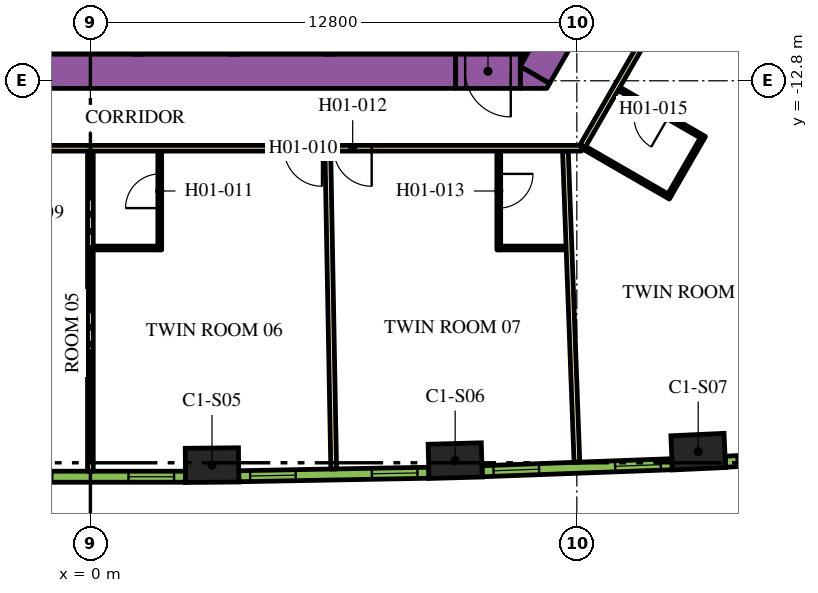
"""IFC4 building model, lengths in metres.
Left out: names, types, materials, properties, quantities, classifications, styles, units other than length and angle.
Written with IfcOpenShell. Run it as: python <this file> out.ifc"""

import sys

from ifc_helpers import new_model, si_unit, direction, frame, frame_2d, origin, origin_2d, place, context, subcontext, project, spatial, polyline, rectangle, outline, extrude, element, fill, save


model = new_model("IFC4")
c1 = context("Model", 3, precision=1e-05, world=origin(), true_north=direction((0.0, 1.0)))
c2 = subcontext(c1, "Body", "Model", "MODEL_VIEW")
j1 = project(units=[si_unit("LENGTHUNIT", "METRE"), si_unit("PLANEANGLEUNIT", "RADIAN")], contexts=[c1])
p1 = place(None, origin())
s1 = spatial("IfcSite", under=j1, at=p1, CompositionType="ELEMENT")
p2 = place(p1, origin())
s2 = spatial("IfcBuilding", under=s1, at=p2, CompositionType="ELEMENT")
p3 = place(p2, frame((0.0, 0.0, 27.6)))
s3 = spatial("IfcBuildingStorey", under=s2, at=p3, CompositionType="ELEMENT", Elevation=27.6)
for number, where, z_axis, x_axis in (
    (1, (3.2, -22.913, 0.0), (0.0, 0.0, 1.0), (1.0, 0.009, 0.0)),
    (2, (9.599, -22.795, 0.0), (0.0, 0.0, 1.0), (1.0, 0.028, 0.0)),
    (3, (15.994, -22.558, 0.0), (0.0, 0.0, 1.0), (0.999, 0.046, 0.0)),
):
    element("IfcColumn", number, at=place(p3, frame(where, z_axis=z_axis, x_axis=x_axis)), inside=s3, PredefinedType="COLUMN", context=c2, shape_type="SweptSolid", body=[
        extrude(rectangle(XDim=1.4, YDim=0.9, at=origin_2d()), origin(), (0.0, 0.0, 1.0), 3.9),
    ])
p4 = place(p3, frame((11.695, -12.644, 0.0), z_axis=(0.0, 0.0, 1.0), x_axis=(0.500010229568, 0.86601949766, 0.0)))
e4 = element("IfcWall", 4, at=p4, inside=s3, PredefinedType="SOLIDWALL", context=c2, shape_type="SweptSolid", body=[
    extrude(rectangle(XDim=9.326, YDim=0.9, at=frame_2d((4.663, 0.0))), origin(), (0.0, 0.0, 1.0), 3.9),
])
p5 = place(p3, origin())
e5 = element("IfcWall", 5, at=p5, inside=s3, PredefinedType="SOLIDWALL", context=c2, shape_type="SweptSolid", body=[
    extrude(outline(polyline([(12.009, -13.0), (11.312, -13.0), (11.312, -12.425), (12.083, -12.871), (12.009, -13.0)])), origin(), (0.0, 0.0, 1.0), 3.9),
])
e6 = element("IfcWall", 6, at=p5, inside=s3, PredefinedType="SOLIDWALL", context=c2, shape_type="SweptSolid", body=[
    extrude(outline(polyline([(11.489, -12.1), (11.312, -12.407), (11.312, -12.1), (11.489, -12.1)])), origin(), (0.0, 0.0, 1.0), 3.9),
])
p6 = place(p3, frame((-12.019, -12.55, 0.0), z_axis=(0.0, 0.0, 1.0), x_axis=(1.0, 0.0, 0.0)))
e7 = element("IfcWall", 7, at=p6, inside=s3, PredefinedType="SOLIDWALL", context=c2, shape_type="SweptSolid", body=[
    extrude(rectangle(XDim=21.63, YDim=0.9, at=frame_2d((10.815, 0.0))), origin(), (0.0, 0.0, 1.0), 3.9),
])
p7 = place(p3, frame((6.3, -8.67, 0.0), z_axis=(0.0, 0.0, 1.0), x_axis=(0.0, -1.0, 0.0)))
e8 = element("IfcWall", 8, at=p7, inside=s3, PredefinedType="SOLIDWALL", context=c2, shape_type="SweptSolid", body=[
    extrude(rectangle(XDim=3.43, YDim=0.25, at=frame_2d((1.715, 0.0))), origin(), (0.0, 0.0, 1.0), 3.9),
])
for number, where, z_axis, x_axis in (
    (9, (3.78, -12.1, 0.0), (0.0, 0.0, 1.0), (0.0, 1.0, 0.0)),
    (10, (1.26, -12.1, 0.0), (0.0, 0.0, 1.0), (0.0, 1.0, 0.0)),
):
    element("IfcWall", number, at=place(p3, frame(where, z_axis=z_axis, x_axis=x_axis)), inside=s3, PredefinedType="SOLIDWALL", context=c2, shape_type="SweptSolid", body=[
        extrude(rectangle(XDim=2.2, YDim=0.25, at=frame_2d((1.1, 0.0))), origin(), (0.0, 0.0, 1.0), 3.9),
    ])
p8 = place(p3, frame((11.312, -12.55, 0.0), z_axis=(0.0, 0.0, 1.0), x_axis=(-1.0, 0.0, 0.0)))
e11 = element("IfcWall", 11, at=p8, inside=s3, PredefinedType="SOLIDWALL", context=c2, shape_type="SweptSolid", body=[
    extrude(rectangle(XDim=1.7, YDim=0.9, at=frame_2d((0.85, 0.0))), origin(), (0.0, 0.0, 1.0), 3.9),
])
p9 = place(p8, frame((0.25, 0.0, 0.0)))
e12 = element("IfcOpeningElement", 12, at=p9, cuts=e11, PredefinedType="OPENING", context=c2, shape_type="SweptSolid", body=[
    extrude(rectangle(XDim=1.2, YDim=2.1, at=frame_2d((0.6, 1.05))), frame((0.0, 0.46, 0.0), z_axis=(0.0, -1.0, 0.0), x_axis=(1.0, 0.0, 0.0)), (0.0, 0.0, 1.0), 0.92),
])
p10 = place(p3, frame((16.412, -8.523, 0.0), z_axis=(0.0, 0.0, 1.0), x_axis=(0.866022197818, -0.500005552856, 0.0)))
e13 = element("IfcWall", 13, at=p10, inside=s3, PredefinedType="PARTITIONING", context=c2, shape_type="SweptSolid", body=[
    extrude(rectangle(XDim=16.224, YDim=0.15, at=frame_2d((8.112, 0.0))), origin(), (0.0, 0.0, 1.0), 2.75),
])
p11 = place(p10, frame((7.949, 0.0, 0.0)))
e14 = element("IfcOpeningElement", 14, at=p11, cuts=e13, PredefinedType="OPENING", context=c2, shape_type="SweptSolid", body=[
    extrude(rectangle(XDim=1.0, YDim=2.1, at=frame_2d((0.5, 1.05))), frame((0.0, 0.085, 0.0), z_axis=(0.0, -1.0, 0.0), x_axis=(1.0, 0.0, 0.0)), (0.0, 0.0, 1.0), 0.17),
])
p12 = place(p10, frame((0.526, 0.0, 0.0)))
e15 = element("IfcOpeningElement", 15, at=p12, cuts=e13, PredefinedType="OPENING", context=c2, shape_type="SweptSolid", body=[
    extrude(rectangle(XDim=1.0, YDim=2.1, at=frame_2d((0.5, 1.05))), frame((0.0, 0.085, 0.0), z_axis=(0.0, -1.0, 0.0), x_axis=(1.0, 0.0, 0.0)), (0.0, 0.0, 1.0), 0.17),
])
p13 = place(p3, frame((12.918, -14.575, 0.0), z_axis=(0.0, 0.0, 1.0), x_axis=(-1.0, 0.0, 0.0)))
e16 = element("IfcWall", 16, at=p13, inside=s3, PredefinedType="PARTITIONING", context=c2, shape_type="SweptSolid", body=[
    extrude(rectangle(XDim=25.766, YDim=0.15, at=frame_2d((12.883, 0.0))), origin(), (0.0, 0.0, 1.0), 2.75),
])
p14 = place(p13, frame((24.586, 0.0, 0.0)))
e17 = element("IfcOpeningElement", 17, at=p14, cuts=e16, PredefinedType="OPENING", context=c2, shape_type="SweptSolid", body=[
    extrude(rectangle(XDim=1.0, YDim=2.1, at=frame_2d((0.5, 1.05))), frame((0.0, 0.085, 0.0), z_axis=(0.0, -1.0, 0.0), x_axis=(1.0, 0.0, 0.0)), (0.0, 0.0, 1.0), 0.17),
])
p15 = place(p13, frame((16.195, 0.0, 0.0)))
e18 = element("IfcOpeningElement", 18, at=p15, cuts=e16, PredefinedType="OPENING", context=c2, shape_type="SweptSolid", body=[
    extrude(rectangle(XDim=1.0, YDim=2.1, at=frame_2d((0.5, 1.05))), frame((0.0, 0.085, 0.0), z_axis=(0.0, -1.0, 0.0), x_axis=(1.0, 0.0, 0.0)), (0.0, 0.0, 1.0), 0.17),
])
p16 = place(p13, frame((14.066, 0.0, 0.0)))
e19 = element("IfcOpeningElement", 19, at=p16, cuts=e16, PredefinedType="OPENING", context=c2, shape_type="SweptSolid", body=[
    extrude(rectangle(XDim=0.9, YDim=2.1, at=frame_2d((0.45, 1.05))), frame((0.0, 0.085, 0.0), z_axis=(0.0, -1.0, 0.0), x_axis=(1.0, 0.0, 0.0)), (0.0, 0.0, 1.0), 0.17),
])
p17 = place(p13, frame((6.824, 0.0, 0.0)))
e20 = element("IfcOpeningElement", 20, at=p17, cuts=e16, PredefinedType="OPENING", context=c2, shape_type="SweptSolid", body=[
    extrude(rectangle(XDim=1.0, YDim=2.1, at=frame_2d((0.5, 1.05))), frame((0.0, 0.085, 0.0), z_axis=(0.0, -1.0, 0.0), x_axis=(1.0, 0.0, 0.0)), (0.0, 0.0, 1.0), 0.17),
])
p18 = place(p13, frame((5.517, 0.0, 0.0)))
e21 = element("IfcOpeningElement", 21, at=p18, cuts=e16, PredefinedType="OPENING", context=c2, shape_type="SweptSolid", body=[
    extrude(rectangle(XDim=1.0, YDim=2.1, at=frame_2d((0.5, 1.05))), frame((0.0, 0.085, 0.0), z_axis=(0.0, -1.0, 0.0), x_axis=(1.0, 0.0, 0.0)), (0.0, 0.0, 1.0), 0.17),
])
p19 = place(p3, frame((15.587, -9.952, 0.0), z_axis=(0.0, 0.0, 1.0), x_axis=(-0.500016618951, -0.866015808616, 0.0)))
e22 = element("IfcWall", 22, at=p19, inside=s3, PredefinedType="PARTITIONING", context=c2, shape_type="SweptSolid", body=[
    extrude(rectangle(XDim=5.268, YDim=0.15, at=frame_2d((2.634, 0.0))), origin(), (0.0, 0.0, 1.0), 2.75),
])
p20 = place(p19, frame((0.225, 0.0, 0.0)))
e23 = element("IfcOpeningElement", 23, at=p20, cuts=e22, PredefinedType="OPENING", context=c2, shape_type="SweptSolid", body=[
    extrude(rectangle(XDim=1.0, YDim=2.1, at=frame_2d((0.5, 1.05))), frame((0.0, 0.085, 0.0), z_axis=(0.0, -1.0, 0.0), x_axis=(1.0, 0.0, 0.0)), (0.0, 0.0, 1.0), 0.17),
])
p21 = place(p3, frame((29.638, -18.064, 0.0), z_axis=(0.0, 0.0, 1.0), x_axis=(-0.866026175601, 0.499998663172, 0.0)))
e24 = element("IfcWall", 24, at=p21, inside=s3, PredefinedType="PARTITIONING", context=c2, shape_type="SweptSolid", body=[
    extrude(rectangle(XDim=16.144, YDim=0.15, at=frame_2d((8.072, 0.0))), origin(), (0.0, 0.0, 1.0), 2.75),
])
p22 = place(p21, frame((11.004, 0.0, 0.0)))
e25 = element("IfcOpeningElement", 25, at=p22, cuts=e24, PredefinedType="OPENING", context=c2, shape_type="SweptSolid", body=[
    extrude(rectangle(XDim=1.0, YDim=2.1, at=frame_2d((0.5, 1.05))), frame((0.0, 0.085, 0.0), z_axis=(0.0, -1.0, 0.0), x_axis=(1.0, 0.0, 0.0)), (0.0, 0.0, 1.0), 0.17),
])
p23 = place(p21, frame((7.275, 0.0, 0.0)))
e26 = element("IfcOpeningElement", 26, at=p23, cuts=e24, PredefinedType="OPENING", context=c2, shape_type="SweptSolid", body=[
    extrude(rectangle(XDim=1.0, YDim=2.1, at=frame_2d((0.5, 1.05))), frame((0.0, 0.085, 0.0), z_axis=(0.0, -1.0, 0.0), x_axis=(1.0, 0.0, 0.0)), (0.0, 0.0, 1.0), 0.17),
])
p24 = place(p3, frame((0.0, -23.073, 0.0), z_axis=(0.0, 0.0, 1.0), x_axis=(0.0, 1.0, 0.0)))
e27 = element("IfcWall", 27, at=p24, inside=s3, PredefinedType="PARTITIONING", context=c2, shape_type="SweptSolid", body=[
    extrude(rectangle(XDim=8.423, YDim=0.15, at=frame_2d((4.212, 0.0))), origin(), (0.0, 0.0, 1.0), 2.75),
])
p25 = place(p3, frame((6.402, -23.014, 0.0), z_axis=(0.0, 0.0, 1.0), x_axis=(-0.01849587109, 0.999828936745, 0.0)))
e28 = element("IfcWall", 28, at=p25, inside=s3, PredefinedType="PARTITIONING", context=c2, shape_type="SweptSolid", body=[
    extrude(rectangle(XDim=8.355, YDim=0.15, at=frame_2d((4.178, 0.0))), origin(), (0.0, 0.0, 1.0), 2.75),
])
p26 = place(p3, frame((12.802, -22.836, 0.0), z_axis=(0.0, 0.0, 1.0), x_axis=(-0.036969723281, 0.999316386116, 0.0)))
e29 = element("IfcWall", 29, at=p26, inside=s3, PredefinedType="PARTITIONING", context=c2, shape_type="SweptSolid", body=[
    extrude(rectangle(XDim=8.182, YDim=0.15, at=frame_2d((4.091, 0.0))), origin(), (0.0, 0.0, 1.0), 2.75),
])
p27 = place(p3, frame((1.825, -17.25, 0.0), z_axis=(0.0, 0.0, 1.0), x_axis=(0.0, 1.0, 0.0)))
e30 = element("IfcWall", 30, at=p27, inside=s3, PredefinedType="PARTITIONING", context=c2, shape_type="SweptSolid", body=[
    extrude(rectangle(XDim=2.6, YDim=0.1, at=frame_2d((1.3, 0.0))), origin(), (0.0, 0.0, 1.0), 2.75),
])
p28 = place(p27, frame((1.1, 0.0, 0.0)))
e31 = element("IfcOpeningElement", 31, at=p28, cuts=e30, PredefinedType="OPENING", context=c2, shape_type="SweptSolid", body=[
    extrude(rectangle(XDim=0.9, YDim=2.1, at=frame_2d((0.45, 1.05))), frame((0.0, 0.06, 0.0), z_axis=(0.0, -1.0, 0.0), x_axis=(1.0, 0.0, 0.0)), (0.0, 0.0, 1.0), 0.12),
])
p29 = place(p3, frame((1.775, -17.2, 0.0), z_axis=(0.0, 0.0, 1.0), x_axis=(-1.0, 0.0, 0.0)))
e32 = element("IfcWall", 32, at=p29, inside=s3, PredefinedType="PARTITIONING", context=c2, shape_type="SweptSolid", body=[
    extrude(rectangle(XDim=1.7, YDim=0.1, at=frame_2d((0.85, 0.0))), origin(), (0.0, 0.0, 1.0), 2.75),
])
p30 = place(p3, frame((10.746, -14.65, 0.0), z_axis=(0.0, 0.0, 1.0), x_axis=(0.0, -1.0, 0.0)))
e33 = element("IfcWall", 33, at=p30, inside=s3, PredefinedType="PARTITIONING", context=c2, shape_type="SweptSolid", body=[
    extrude(rectangle(XDim=2.6, YDim=0.1, at=frame_2d((1.3, 0.0))), origin(), (0.0, 0.0, 1.0), 2.75),
])
p31 = place(p30, frame((0.6, 0.0, 0.0)))
e34 = element("IfcOpeningElement", 34, at=p31, cuts=e33, PredefinedType="OPENING", context=c2, shape_type="SweptSolid", body=[
    extrude(rectangle(XDim=0.9, YDim=2.1, at=frame_2d((0.45, 1.05))), frame((0.0, 0.06, 0.0), z_axis=(0.0, -1.0, 0.0), x_axis=(1.0, 0.0, 0.0)), (0.0, 0.0, 1.0), 0.12),
])
p32 = place(p3, frame((10.806, -17.2, 0.0), z_axis=(0.0, 0.0, 1.0), x_axis=(1.0, 0.0, 0.0)))
e35 = element("IfcWall", 35, at=p32, inside=s3, PredefinedType="PARTITIONING", context=c2, shape_type="SweptSolid", body=[
    extrude(rectangle(XDim=1.71, YDim=0.1, at=frame_2d((0.855, 0.0))), origin(), (0.0, 0.0, 1.0), 2.75),
])
p33 = place(p3, frame((16.16, -14.31, 0.0), z_axis=(0.0, 0.0, 1.0), x_axis=(-0.866062058628, 0.499936506574, 0.0)))
e36 = element("IfcWall", 36, at=p33, inside=s3, PredefinedType="PARTITIONING", context=c2, shape_type="SweptSolid", body=[
    extrude(rectangle(XDim=2.6, YDim=0.1, at=frame_2d((1.3, 0.0))), origin(), (0.0, 0.0, 1.0), 2.75),
])
p34 = place(p33, frame((1.1, 0.0, 0.0)))
e37 = element("IfcOpeningElement", 37, at=p34, cuts=e36, PredefinedType="OPENING", context=c2, shape_type="SweptSolid", body=[
    extrude(rectangle(XDim=0.9, YDim=2.1, at=frame_2d((0.45, 1.05))), frame((0.0, 0.06, 0.0), z_axis=(0.0, -1.0, 0.0), x_axis=(1.0, 0.0, 0.0)), (0.0, 0.0, 1.0), 0.12),
])
p35 = place(p3, frame((16.092, -14.329, 0.0), z_axis=(0.0, 0.0, 1.0), x_axis=(-0.500062241894, -0.865989465428, 0.0)))
e38 = element("IfcWall", 38, at=p35, inside=s3, PredefinedType="PARTITIONING", context=c2, shape_type="SweptSolid", body=[
    extrude(rectangle(XDim=1.7, YDim=0.1, at=frame_2d((0.85, 0.0))), origin(), (0.0, 0.0, 1.0), 2.75),
])
p36 = place(p3, frame((13.008, -14.569, 0.0), z_axis=(0.0, 0.0, 1.0), x_axis=(0.865997922154, -0.500047596559, 0.0)))
e39 = element("IfcWall", 39, at=p36, inside=s3, PredefinedType="PARTITIONING", context=c2, shape_type="SweptSolid", body=[
    extrude(rectangle(XDim=2.6, YDim=0.1, at=frame_2d((1.3, 0.0))), origin(), (0.0, 0.0, 1.0), 2.75),
])
p37 = place(p3, frame((-2.499, -23.218, 0.0), z_axis=(0.0, 0.0, 1.0), x_axis=(1.0, 0.0, 0.0)))
e40 = element("IfcWall", 40, at=p37, inside=s3, PredefinedType="SOLIDWALL", context=c2, shape_type="SweptSolid", body=[
    extrude(rectangle(XDim=4.998, YDim=0.29, at=frame_2d((2.499, 0.0))), origin(), (0.0, 0.0, 1.0), 3.65),
])
p38 = place(p37, frame((0.297, 0.0, 0.9)))
e41 = element("IfcOpeningElement", 41, at=p38, cuts=e40, PredefinedType="OPENING", context=c2, shape_type="SweptSolid", body=[
    extrude(rectangle(XDim=1.2, YDim=2.15, at=frame_2d((0.6, 1.075))), frame((0.0, 0.155, 0.0), z_axis=(0.0, -1.0, 0.0), x_axis=(1.0, 0.0, 0.0)), (0.0, 0.0, 1.0), 0.31),
])
p39 = place(p37, frame((3.501, 0.0, 0.9)))
e42 = element("IfcOpeningElement", 42, at=p39, cuts=e40, PredefinedType="OPENING", context=c2, shape_type="SweptSolid", body=[
    extrude(rectangle(XDim=1.2, YDim=2.15, at=frame_2d((0.6, 1.075))), frame((0.0, 0.155, 0.0), z_axis=(0.0, -1.0, 0.0), x_axis=(1.0, 0.0, 0.0)), (0.0, 0.0, 1.0), 0.31),
])
p40 = place(p3, frame((3.906, -23.205, 0.0), z_axis=(0.0, 0.0, 1.0), x_axis=(0.999829529479, 0.018463801951, 0.0)))
e43 = element("IfcWall", 43, at=p40, inside=s3, PredefinedType="SOLIDWALL", context=c2, shape_type="SweptSolid", body=[
    extrude(rectangle(XDim=4.998, YDim=0.29, at=frame_2d((2.499, 0.0))), origin(), (0.0, 0.0, 1.0), 3.65),
])
p41 = place(p40, frame((0.297, 0.0, 0.9)))
e44 = element("IfcOpeningElement", 44, at=p41, cuts=e43, PredefinedType="OPENING", context=c2, shape_type="SweptSolid", body=[
    extrude(rectangle(XDim=1.2, YDim=2.15, at=frame_2d((0.6, 1.075))), frame((0.0, 0.155, 0.0), z_axis=(0.0, -1.0, 0.0), x_axis=(1.0, 0.0, 0.0)), (0.0, 0.0, 1.0), 0.31),
])
p42 = place(p40, frame((3.501, 0.0, 0.9)))
e45 = element("IfcOpeningElement", 45, at=p42, cuts=e43, PredefinedType="OPENING", context=c2, shape_type="SweptSolid", body=[
    extrude(rectangle(XDim=1.2, YDim=2.15, at=frame_2d((0.6, 1.075))), frame((0.0, 0.155, 0.0), z_axis=(0.0, -1.0, 0.0), x_axis=(1.0, 0.0, 0.0)), (0.0, 0.0, 1.0), 0.31),
])
p43 = place(p3, frame((10.31, -23.074, 0.0), z_axis=(0.0, 0.0, 1.0), x_axis=(0.999317974969, 0.036926750529, 0.0)))
e46 = element("IfcWall", 46, at=p43, inside=s3, PredefinedType="SOLIDWALL", context=c2, shape_type="SweptSolid", body=[
    extrude(rectangle(XDim=4.998, YDim=0.29, at=frame_2d((2.499, 0.0))), origin(), (0.0, 0.0, 1.0), 3.65),
])
p44 = place(p43, frame((0.297, 0.0, 0.9)))
e47 = element("IfcOpeningElement", 47, at=p44, cuts=e46, PredefinedType="OPENING", context=c2, shape_type="SweptSolid", body=[
    extrude(rectangle(XDim=1.2, YDim=2.15, at=frame_2d((0.6, 1.075))), frame((0.0, 0.155, 0.0), z_axis=(0.0, -1.0, 0.0), x_axis=(1.0, 0.0, 0.0)), (0.0, 0.0, 1.0), 0.31),
])
p45 = place(p43, frame((3.501, 0.0, 0.9)))
e48 = element("IfcOpeningElement", 48, at=p45, cuts=e46, PredefinedType="OPENING", context=c2, shape_type="SweptSolid", body=[
    extrude(rectangle(XDim=1.2, YDim=2.15, at=frame_2d((0.6, 1.075))), frame((0.0, 0.155, 0.0), z_axis=(0.0, -1.0, 0.0), x_axis=(1.0, 0.0, 0.0)), (0.0, 0.0, 1.0), 0.31),
])
p46 = place(p3, frame((16.711, -22.824, 0.0), z_axis=(0.0, 0.0, 1.0), x_axis=(0.998464708705, 0.055391564976, 0.0)))
e49 = element("IfcWall", 49, at=p46, inside=s3, PredefinedType="SOLIDWALL", context=c2, shape_type="SweptSolid", body=[
    extrude(rectangle(XDim=4.998, YDim=0.29, at=frame_2d((2.499, 0.0))), origin(), (0.0, 0.0, 1.0), 3.65),
])
p47 = place(p46, frame((0.297, 0.0, 0.9)))
e50 = element("IfcOpeningElement", 50, at=p47, cuts=e49, PredefinedType="OPENING", context=c2, shape_type="SweptSolid", body=[
    extrude(rectangle(XDim=1.2, YDim=2.15, at=frame_2d((0.6, 1.075))), frame((0.0, 0.155, 0.0), z_axis=(0.0, -1.0, 0.0), x_axis=(1.0, 0.0, 0.0)), (0.0, 0.0, 1.0), 0.31),
])
p48 = place(p46, frame((3.501, 0.0, 0.9)))
e51 = element("IfcOpeningElement", 51, at=p48, cuts=e49, PredefinedType="OPENING", context=c2, shape_type="SweptSolid", body=[
    extrude(rectangle(XDim=1.2, YDim=2.15, at=frame_2d((0.6, 1.075))), frame((0.0, 0.155, 0.0), z_axis=(0.0, -1.0, 0.0), x_axis=(1.0, 0.0, 0.0)), (0.0, 0.0, 1.0), 0.31),
])
p49 = place(p9, origin())
e52 = element("IfcDoor", 52, at=p49, inside=s3, OperationType="SINGLE_SWING_LEFT", PredefinedType="DOOR", context=c2, shape_type="SweptSolid", body=[
    extrude(rectangle(XDim=1.2, YDim=2.1, at=frame_2d((0.6, 1.05))), frame((0.0, 0.025, 0.0), z_axis=(0.0, -1.0, 0.0), x_axis=(1.0, 0.0, 0.0)), (0.0, 0.0, 1.0), 0.05),
])
fill(e12, e52)
p50 = place(p17, origin())
e53 = element("IfcDoor", 53, at=p50, inside=s3, OperationType="SINGLE_SWING_LEFT", PredefinedType="DOOR", context=c2, shape_type="SweptSolid", body=[
    extrude(rectangle(XDim=1.0, YDim=2.1, at=frame_2d((0.5, 1.05))), frame((0.0, 0.025, 0.0), z_axis=(0.0, -1.0, 0.0), x_axis=(1.0, 0.0, 0.0)), (0.0, 0.0, 1.0), 0.05),
])
fill(e20, e53)
p51 = place(p28, origin())
e54 = element("IfcDoor", 54, at=p51, inside=s3, OperationType="SINGLE_SWING_RIGHT", PredefinedType="DOOR", context=c2, shape_type="SweptSolid", body=[
    extrude(rectangle(XDim=0.9, YDim=2.1, at=frame_2d((0.45, 1.05))), frame((0.0, 0.025, 0.0), z_axis=(0.0, -1.0, 0.0), x_axis=(1.0, 0.0, 0.0)), (0.0, 0.0, 1.0), 0.05),
])
fill(e31, e54)
p52 = place(p18, origin())
e55 = element("IfcDoor", 55, at=p52, inside=s3, OperationType="SINGLE_SWING_RIGHT", PredefinedType="DOOR", context=c2, shape_type="SweptSolid", body=[
    extrude(rectangle(XDim=1.0, YDim=2.1, at=frame_2d((0.5, 1.05))), frame((0.0, 0.025, 0.0), z_axis=(0.0, -1.0, 0.0), x_axis=(1.0, 0.0, 0.0)), (0.0, 0.0, 1.0), 0.05),
])
fill(e21, e55)
p53 = place(p31, origin())
e56 = element("IfcDoor", 56, at=p53, inside=s3, OperationType="SINGLE_SWING_LEFT", PredefinedType="DOOR", context=c2, shape_type="SweptSolid", body=[
    extrude(rectangle(XDim=0.9, YDim=2.1, at=frame_2d((0.45, 1.05))), frame((0.0, 0.025, 0.0), z_axis=(0.0, -1.0, 0.0), x_axis=(1.0, 0.0, 0.0)), (0.0, 0.0, 1.0), 0.05),
])
fill(e34, e56)
p54 = place(p34, origin())
e57 = element("IfcDoor", 57, at=p54, inside=s3, OperationType="SINGLE_SWING_LEFT", PredefinedType="DOOR", context=c2, shape_type="SweptSolid", body=[
    extrude(rectangle(XDim=0.9, YDim=2.1, at=frame_2d((0.45, 1.05))), frame((0.0, 0.025, 0.0), z_axis=(0.0, -1.0, 0.0), x_axis=(1.0, 0.0, 0.0)), (0.0, 0.0, 1.0), 0.05),
])
fill(e37, e57)
p55 = place(p39, origin())
e58 = element("IfcWindow", 58, at=p55, inside=s3, PartitioningType="DOUBLE_PANEL_VERTICAL", PredefinedType="WINDOW", context=c2, shape_type="SweptSolid", body=[
    extrude(rectangle(XDim=1.2, YDim=2.15, at=frame_2d((0.6, 1.075))), frame((0.0, 0.015, 0.0), z_axis=(0.0, -1.0, 0.0), x_axis=(1.0, 0.0, 0.0)), (0.0, 0.0, 1.0), 0.06),
])
fill(e42, e58)
p56 = place(p41, origin())
e59 = element("IfcWindow", 59, at=p56, inside=s3, PartitioningType="DOUBLE_PANEL_VERTICAL", PredefinedType="WINDOW", context=c2, shape_type="SweptSolid", body=[
    extrude(rectangle(XDim=1.2, YDim=2.15, at=frame_2d((0.6, 1.075))), frame((0.0, 0.015, 0.0), z_axis=(0.0, -1.0, 0.0), x_axis=(1.0, 0.0, 0.0)), (0.0, 0.0, 1.0), 0.06),
])
fill(e44, e59)
p57 = place(p42, origin())
e60 = element("IfcWindow", 60, at=p57, inside=s3, PartitioningType="DOUBLE_PANEL_VERTICAL", PredefinedType="WINDOW", context=c2, shape_type="SweptSolid", body=[
    extrude(rectangle(XDim=1.2, YDim=2.15, at=frame_2d((0.6, 1.075))), frame((0.0, 0.015, 0.0), z_axis=(0.0, -1.0, 0.0), x_axis=(1.0, 0.0, 0.0)), (0.0, 0.0, 1.0), 0.06),
])
fill(e45, e60)
p58 = place(p44, origin())
e61 = element("IfcWindow", 61, at=p58, inside=s3, PartitioningType="DOUBLE_PANEL_VERTICAL", PredefinedType="WINDOW", context=c2, shape_type="SweptSolid", body=[
    extrude(rectangle(XDim=1.2, YDim=2.15, at=frame_2d((0.6, 1.075))), frame((0.0, 0.015, 0.0), z_axis=(0.0, -1.0, 0.0), x_axis=(1.0, 0.0, 0.0)), (0.0, 0.0, 1.0), 0.06),
])
fill(e47, e61)
p59 = place(p45, origin())
e62 = element("IfcWindow", 62, at=p59, inside=s3, PartitioningType="DOUBLE_PANEL_VERTICAL", PredefinedType="WINDOW", context=c2, shape_type="SweptSolid", body=[
    extrude(rectangle(XDim=1.2, YDim=2.15, at=frame_2d((0.6, 1.075))), frame((0.0, 0.015, 0.0), z_axis=(0.0, -1.0, 0.0), x_axis=(1.0, 0.0, 0.0)), (0.0, 0.0, 1.0), 0.06),
])
fill(e48, e62)
p60 = place(p47, origin())
e63 = element("IfcWindow", 63, at=p60, inside=s3, PartitioningType="DOUBLE_PANEL_VERTICAL", PredefinedType="WINDOW", context=c2, shape_type="SweptSolid", body=[
    extrude(rectangle(XDim=1.2, YDim=2.15, at=frame_2d((0.6, 1.075))), frame((0.0, 0.015, 0.0), z_axis=(0.0, -1.0, 0.0), x_axis=(1.0, 0.0, 0.0)), (0.0, 0.0, 1.0), 0.06),
])
fill(e50, e63)
save(model, sys.argv[1])
